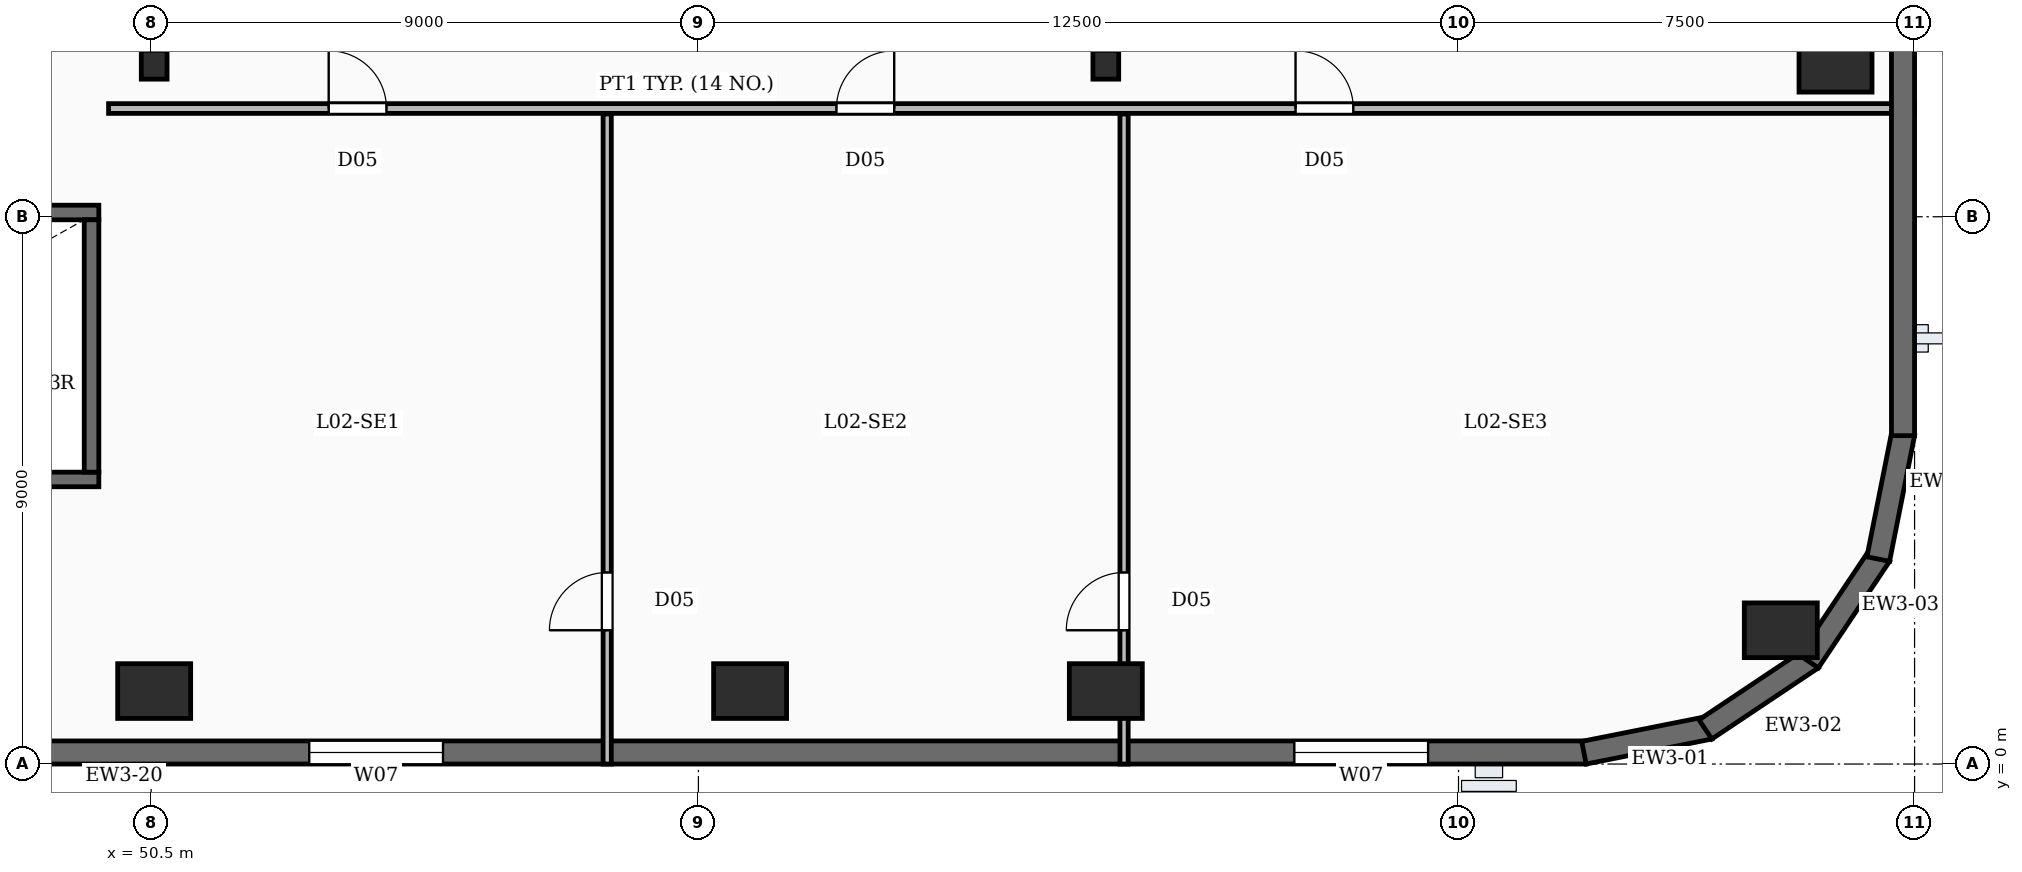
"""IFC4 building model, lengths in metres.
Left out: names, types, materials, properties, quantities, classifications, styles, units other than length and angle.
Written with IfcOpenShell. Run it as: python <this file> out.ifc"""

import sys

from ifc_helpers import new_model, si_unit, direction, frame, frame_2d, origin, origin_2d, place, context, subcontext, project, spatial, rectangle, i_section, extrude, element, fill, save


model = new_model("IFC4")
c1 = context("Model", 3, precision=1e-05, world=origin(), true_north=direction((0.0, 1.0)))
c2 = subcontext(c1, "Body", "Model", "MODEL_VIEW")
j1 = project(units=[si_unit("LENGTHUNIT", "METRE"), si_unit("PLANEANGLEUNIT", "RADIAN")], contexts=[c1])
p1 = place(None, origin())
s1 = spatial("IfcSite", under=j1, at=p1, CompositionType="ELEMENT")
p2 = place(p1, origin())
s2 = spatial("IfcBuilding", under=s1, at=p2, CompositionType="ELEMENT")
p3 = place(p2, frame((0.0, 0.0, 13.0)))
s3 = spatial("IfcBuildingStorey", under=s2, at=p3, CompositionType="ELEMENT", Elevation=13.0)
for number, where, z_axis, x_axis in (
    (1, (50.55, 1.2, -0.35), (0.0, 0.0, 1.0), (1.0, 0.0, 0.0)),
    (2, (60.35, 1.2, -0.35), (0.0, 0.0, 1.0), (1.0, 0.0, 0.0)),
    (3, (66.2, 1.2, -0.35), (0.0, 0.0, 1.0), (1.0, 0.0, 0.0)),
    (4, (77.3, 2.2, -0.35), (0.0, 0.0, 1.0), (1.0, 0.0, 0.0)),
    (5, (78.2, 11.5, -0.35), (0.0, 0.0, 1.0), (1.0, 0.0, 0.0)),
):
    element("IfcColumn", number, at=place(p3, frame(where, z_axis=z_axis, x_axis=x_axis)), inside=s3, PredefinedType="COLUMN", context=c2, shape_type="SweptSolid", body=[
        extrude(rectangle(XDim=1.2, YDim=0.9, at=origin_2d()), origin(), (0.0, 0.0, 1.0), 5.0),
    ])
for number, where, z_axis, x_axis in (
    (6, (50.55, 11.5, -0.35), (0.0, 0.0, 1.0), (1.0, 0.0, 0.0)),
    (7, (66.2, 11.5, -0.35), (0.0, 0.0, 1.0), (1.0, 0.0, 0.0)),
):
    element("IfcColumn", number, at=place(p3, frame(where, z_axis=z_axis, x_axis=x_axis)), inside=s3, PredefinedType="COLUMN", context=c2, shape_type="SweptSolid", body=[
        extrude(i_section(OverallWidth=0.424, OverallDepth=0.474, WebThickness=0.048, FlangeThickness=0.077, FilletRadius=0.02, at=origin_2d()), origin(), (0.0, 0.0, 1.0), 5.0),
    ])
for number, where, z_axis, x_axis in (
    (8, (76.129, 0.597, 0.0), (0.0, 0.0, 1.0), (-0.981, -0.195, 0.0)),
    (9, (77.813, 1.74, 0.0), (0.0, 0.0, 1.0), (-0.832, -0.556, 0.0)),
    (10, (78.931, 3.439, 0.0), (0.0, 0.0, 1.0), (-0.556, -0.832, 0.0)),
    (11, (79.314, 5.437, 0.0), (0.0, 0.0, 1.0), (-0.195, -0.981, 0.0)),
):
    element("IfcWall", number, at=place(p3, frame(where, z_axis=z_axis, x_axis=x_axis)), inside=s3, PredefinedType="SOLIDWALL", context=c2, shape_type="SweptSolid", body=[
        extrude(rectangle(XDim=2.107, YDim=0.38, at=frame_2d((1.053, 0.0))), origin(), (0.0, 0.0, 1.0), 4.65),
    ])
p4 = place(p3, frame((79.31, 49.1, 0.0), z_axis=(0.0, 0.0, 1.0), x_axis=(0.0, -1.0, 0.0)))
e12 = element("IfcWall", 12, at=p4, inside=s3, PredefinedType="SOLIDWALL", context=c2, shape_type="SweptSolid", body=[
    extrude(rectangle(XDim=43.7, YDim=0.38, at=frame_2d((21.85, 0.0))), origin(), (0.0, 0.0, 1.0), 4.65),
])
p5 = place(p4, frame((2.6, 0.0, 0.95)))
e13 = element("IfcOpeningElement", 13, at=p5, cuts=e12, PredefinedType="OPENING", context=c2, shape_type="SweptSolid", body=[
    extrude(rectangle(XDim=2.2, YDim=2.5, at=frame_2d((1.1, 1.25))), frame((0.0, 0.2, 0.0), z_axis=(0.0, -1.0, 0.0), x_axis=(1.0, 0.0, 0.0)), (0.0, 0.0, 1.0), 0.4),
])
p6 = place(p4, frame((8.0, 0.0, 0.95)))
e14 = element("IfcOpeningElement", 14, at=p6, cuts=e12, PredefinedType="OPENING", context=c2, shape_type="SweptSolid", body=[
    extrude(rectangle(XDim=2.2, YDim=2.5, at=frame_2d((1.1, 1.25))), frame((0.0, 0.2, 0.0), z_axis=(0.0, -1.0, 0.0), x_axis=(1.0, 0.0, 0.0)), (0.0, 0.0, 1.0), 0.4),
])
p7 = place(p4, frame((18.8, 0.0, 0.95)))
e15 = element("IfcOpeningElement", 15, at=p7, cuts=e12, PredefinedType="OPENING", context=c2, shape_type="SweptSolid", body=[
    extrude(rectangle(XDim=2.2, YDim=2.5, at=frame_2d((1.1, 1.25))), frame((0.0, 0.2, 0.0), z_axis=(0.0, -1.0, 0.0), x_axis=(1.0, 0.0, 0.0)), (0.0, 0.0, 1.0), 0.4),
])
p8 = place(p4, frame((24.2, 0.0, 0.95)))
e16 = element("IfcOpeningElement", 16, at=p8, cuts=e12, PredefinedType="OPENING", context=c2, shape_type="SweptSolid", body=[
    extrude(rectangle(XDim=2.2, YDim=2.5, at=frame_2d((1.1, 1.25))), frame((0.0, 0.2, 0.0), z_axis=(0.0, -1.0, 0.0), x_axis=(1.0, 0.0, 0.0)), (0.0, 0.0, 1.0), 0.4),
])
p9 = place(p4, frame((29.6, 0.0, 0.95)))
e17 = element("IfcOpeningElement", 17, at=p9, cuts=e12, PredefinedType="OPENING", context=c2, shape_type="SweptSolid", body=[
    extrude(rectangle(XDim=2.2, YDim=2.5, at=frame_2d((1.1, 1.25))), frame((0.0, 0.2, 0.0), z_axis=(0.0, -1.0, 0.0), x_axis=(1.0, 0.0, 0.0)), (0.0, 0.0, 1.0), 0.4),
])
p10 = place(p3, frame((74.1, 0.19, 0.0), z_axis=(0.0, 0.0, 1.0), x_axis=(-1.0, 0.0, 0.0)))
e18 = element("IfcWall", 18, at=p10, inside=s3, PredefinedType="SOLIDWALL", context=c2, shape_type="SweptSolid", body=[
    extrude(rectangle(XDim=68.7, YDim=0.38, at=frame_2d((34.35, 0.0))), origin(), (0.0, 0.0, 1.0), 4.65),
])
p11 = place(p10, frame((2.6, 0.0, 0.95)))
e19 = element("IfcOpeningElement", 19, at=p11, cuts=e18, PredefinedType="OPENING", context=c2, shape_type="SweptSolid", body=[
    extrude(rectangle(XDim=2.2, YDim=2.5, at=frame_2d((1.1, 1.25))), frame((0.0, 0.2, 0.0), z_axis=(0.0, -1.0, 0.0), x_axis=(1.0, 0.0, 0.0)), (0.0, 0.0, 1.0), 0.4),
])
p12 = place(p10, frame((18.8, 0.0, 0.95)))
e20 = element("IfcOpeningElement", 20, at=p12, cuts=e18, PredefinedType="OPENING", context=c2, shape_type="SweptSolid", body=[
    extrude(rectangle(XDim=2.2, YDim=2.5, at=frame_2d((1.1, 1.25))), frame((0.0, 0.2, 0.0), z_axis=(0.0, -1.0, 0.0), x_axis=(1.0, 0.0, 0.0)), (0.0, 0.0, 1.0), 0.4),
])
p13 = place(p10, frame((29.6, 0.0, 0.95)))
e21 = element("IfcOpeningElement", 21, at=p13, cuts=e18, PredefinedType="OPENING", context=c2, shape_type="SweptSolid", body=[
    extrude(rectangle(XDim=2.2, YDim=2.5, at=frame_2d((1.1, 1.25))), frame((0.0, 0.2, 0.0), z_axis=(0.0, -1.0, 0.0), x_axis=(1.0, 0.0, 0.0)), (0.0, 0.0, 1.0), 0.4),
])
p14 = place(p10, frame((40.4, 0.0, 0.95)))
e22 = element("IfcOpeningElement", 22, at=p14, cuts=e18, PredefinedType="OPENING", context=c2, shape_type="SweptSolid", body=[
    extrude(rectangle(XDim=2.2, YDim=2.5, at=frame_2d((1.1, 1.25))), frame((0.0, 0.2, 0.0), z_axis=(0.0, -1.0, 0.0), x_axis=(1.0, 0.0, 0.0)), (0.0, 0.0, 1.0), 0.4),
])
p15 = place(p10, frame((45.8, 0.0, 0.95)))
e23 = element("IfcOpeningElement", 23, at=p15, cuts=e18, PredefinedType="OPENING", context=c2, shape_type="SweptSolid", body=[
    extrude(rectangle(XDim=2.2, YDim=2.5, at=frame_2d((1.1, 1.25))), frame((0.0, 0.2, 0.0), z_axis=(0.0, -1.0, 0.0), x_axis=(1.0, 0.0, 0.0)), (0.0, 0.0, 1.0), 0.4),
])
p16 = place(p10, frame((51.2, 0.0, 0.95)))
e24 = element("IfcOpeningElement", 24, at=p16, cuts=e18, PredefinedType="OPENING", context=c2, shape_type="SweptSolid", body=[
    extrude(rectangle(XDim=2.2, YDim=2.5, at=frame_2d((1.1, 1.25))), frame((0.0, 0.2, 0.0), z_axis=(0.0, -1.0, 0.0), x_axis=(1.0, 0.0, 0.0)), (0.0, 0.0, 1.0), 0.4),
])
p17 = place(p10, frame((62.0, 0.0, 0.95)))
e25 = element("IfcOpeningElement", 25, at=p17, cuts=e18, PredefinedType="OPENING", context=c2, shape_type="SweptSolid", body=[
    extrude(rectangle(XDim=2.2, YDim=2.5, at=frame_2d((1.1, 1.25))), frame((0.0, 0.2, 0.0), z_axis=(0.0, -1.0, 0.0), x_axis=(1.0, 0.0, 0.0)), (0.0, 0.0, 1.0), 0.4),
])
p18 = place(p3, frame((39.76, 9.07, 0.0), z_axis=(0.0, 0.0, 1.0), x_axis=(1.0, 0.0, 0.0)))
e26 = element("IfcWall", 26, at=p18, inside=s3, PredefinedType="SOLIDWALL", context=c2, shape_type="SweptSolid", body=[
    extrude(rectangle(XDim=9.88, YDim=0.24, at=frame_2d((4.94, 0.0))), origin(), (0.0, 0.0, 1.0), 4.65),
])
p19 = place(p18, frame((0.69, 0.0, 0.0)))
e27 = element("IfcOpeningElement", 27, at=p19, cuts=e26, PredefinedType="OPENING", context=c2, shape_type="SweptSolid", body=[
    extrude(rectangle(XDim=1.1, YDim=2.15, at=frame_2d((0.55, 1.075))), frame((0.0, 0.13, 0.0), z_axis=(0.0, -1.0, 0.0), x_axis=(1.0, 0.0, 0.0)), (0.0, 0.0, 1.0), 0.26),
])
p20 = place(p3, frame((39.76, 4.68, 0.0), z_axis=(0.0, 0.0, 1.0), x_axis=(1.0, 0.0, 0.0)))
e28 = element("IfcWall", 28, at=p20, inside=s3, PredefinedType="SOLIDWALL", context=c2, shape_type="SweptSolid", body=[
    extrude(rectangle(XDim=9.88, YDim=0.24, at=frame_2d((4.94, 0.0))), origin(), (0.0, 0.0, 1.0), 4.65),
])
p21 = place(p3, frame((49.52, 4.8, 0.0), z_axis=(0.0, 0.0, 1.0), x_axis=(0.0, 1.0, 0.0)))
e29 = element("IfcWall", 29, at=p21, inside=s3, PredefinedType="SOLIDWALL", context=c2, shape_type="SweptSolid", body=[
    extrude(rectangle(XDim=4.15, YDim=0.24, at=frame_2d((2.075, 0.0))), origin(), (0.0, 0.0, 1.0), 4.65),
])
p22 = place(p3, frame((58.0, 0.0, 0.0), z_axis=(0.0, 0.0, 1.0), x_axis=(0.0, 1.0, 0.0)))
e30 = element("IfcWall", 30, at=p22, inside=s3, PredefinedType="PARTITIONING", context=c2, shape_type="SweptSolid", body=[
    extrude(rectangle(XDim=10.69, YDim=0.135, at=frame_2d((5.345, 0.0))), origin(), (0.0, 0.0, 1.0), 3.71),
])
p23 = place(p22, frame((2.2, 0.0, 0.0)))
e31 = element("IfcOpeningElement", 31, at=p23, cuts=e30, PredefinedType="OPENING", context=c2, shape_type="SweptSolid", body=[
    extrude(rectangle(XDim=0.95, YDim=2.15, at=frame_2d((0.475, 1.075))), frame((0.0, 0.077, 0.0), z_axis=(0.0, -1.0, 0.0), x_axis=(1.0, 0.0, 0.0)), (0.0, 0.0, 1.0), 0.155),
])
p24 = place(p3, frame((66.5, 0.0, 0.0), z_axis=(0.0, 0.0, 1.0), x_axis=(0.0, 1.0, 0.0)))
e32 = element("IfcWall", 32, at=p24, inside=s3, PredefinedType="PARTITIONING", context=c2, shape_type="SweptSolid", body=[
    extrude(rectangle(XDim=10.69, YDim=0.135, at=frame_2d((5.345, 0.0))), origin(), (0.0, 0.0, 1.0), 3.71),
])
p25 = place(p24, frame((2.2, 0.0, 0.0)))
e33 = element("IfcOpeningElement", 33, at=p25, cuts=e32, PredefinedType="OPENING", context=c2, shape_type="SweptSolid", body=[
    extrude(rectangle(XDim=0.95, YDim=2.15, at=frame_2d((0.475, 1.075))), frame((0.0, 0.077, 0.0), z_axis=(0.0, -1.0, 0.0), x_axis=(1.0, 0.0, 0.0)), (0.0, 0.0, 1.0), 0.155),
])
p26 = place(p3, frame((49.8, 10.78, 0.0), z_axis=(0.0, 0.0, 1.0), x_axis=(1.0, 0.0, 0.0)))
e34 = element("IfcWall", 34, at=p26, inside=s3, PredefinedType="PARTITIONING", context=c2, shape_type="SweptSolid", body=[
    extrude(rectangle(XDim=29.7, YDim=0.16, at=frame_2d((14.85, 0.0))), origin(), (0.0, 0.0, 1.0), 3.71),
])
p27 = place(p26, frame((3.62, 0.0, 0.0)))
e35 = element("IfcOpeningElement", 35, at=p27, cuts=e34, PredefinedType="OPENING", context=c2, shape_type="SweptSolid", body=[
    extrude(rectangle(XDim=0.95, YDim=2.15, at=frame_2d((0.475, 1.075))), frame((0.0, 0.09, 0.0), z_axis=(0.0, -1.0, 0.0), x_axis=(1.0, 0.0, 0.0)), (0.0, 0.0, 1.0), 0.18),
])
p28 = place(p26, frame((11.97, 0.0, 0.0)))
e36 = element("IfcOpeningElement", 36, at=p28, cuts=e34, PredefinedType="OPENING", context=c2, shape_type="SweptSolid", body=[
    extrude(rectangle(XDim=0.95, YDim=2.15, at=frame_2d((0.475, 1.075))), frame((0.0, 0.09, 0.0), z_axis=(0.0, -1.0, 0.0), x_axis=(1.0, 0.0, 0.0)), (0.0, 0.0, 1.0), 0.18),
])
p29 = place(p26, frame((19.52, 0.0, 0.0)))
e37 = element("IfcOpeningElement", 37, at=p29, cuts=e34, PredefinedType="OPENING", context=c2, shape_type="SweptSolid", body=[
    extrude(rectangle(XDim=0.95, YDim=2.15, at=frame_2d((0.475, 1.075))), frame((0.0, 0.09, 0.0), z_axis=(0.0, -1.0, 0.0), x_axis=(1.0, 0.0, 0.0)), (0.0, 0.0, 1.0), 0.18),
])
p30 = place(p11, origin())
e38 = element("IfcWindow", 38, at=p30, inside=s3, PartitioningType="DOUBLE_PANEL_VERTICAL", PredefinedType="WINDOW", context=c2, shape_type="SweptSolid", body=[
    extrude(rectangle(XDim=2.2, YDim=2.5, at=frame_2d((1.1, 1.25))), frame((0.0, 0.03, 0.0), z_axis=(0.0, -1.0, 0.0), x_axis=(1.0, 0.0, 0.0)), (0.0, 0.0, 1.0), 0.06),
])
fill(e19, e38)
p31 = place(p12, origin())
e39 = element("IfcWindow", 39, at=p31, inside=s3, PartitioningType="DOUBLE_PANEL_VERTICAL", PredefinedType="WINDOW", context=c2, shape_type="SweptSolid", body=[
    extrude(rectangle(XDim=2.2, YDim=2.5, at=frame_2d((1.1, 1.25))), frame((0.0, 0.03, 0.0), z_axis=(0.0, -1.0, 0.0), x_axis=(1.0, 0.0, 0.0)), (0.0, 0.0, 1.0), 0.06),
])
fill(e20, e39)
p32 = place(p23, origin())
e40 = element("IfcDoor", 40, at=p32, inside=s3, OperationType="SINGLE_SWING_LEFT", PredefinedType="DOOR", context=c2, shape_type="SweptSolid", body=[
    extrude(rectangle(XDim=0.95, YDim=2.15, at=frame_2d((0.475, 1.075))), frame((0.0, 0.025, 0.0), z_axis=(0.0, -1.0, 0.0), x_axis=(1.0, 0.0, 0.0)), (0.0, 0.0, 1.0), 0.05),
])
fill(e31, e40)
p33 = place(p25, origin())
e41 = element("IfcDoor", 41, at=p33, inside=s3, OperationType="SINGLE_SWING_LEFT", PredefinedType="DOOR", context=c2, shape_type="SweptSolid", body=[
    extrude(rectangle(XDim=0.95, YDim=2.15, at=frame_2d((0.475, 1.075))), frame((0.0, 0.025, 0.0), z_axis=(0.0, -1.0, 0.0), x_axis=(1.0, 0.0, 0.0)), (0.0, 0.0, 1.0), 0.05),
])
fill(e33, e41)
p34 = place(p27, origin())
e42 = element("IfcDoor", 42, at=p34, inside=s3, OperationType="SINGLE_SWING_LEFT", PredefinedType="DOOR", context=c2, shape_type="SweptSolid", body=[
    extrude(rectangle(XDim=0.95, YDim=2.15, at=frame_2d((0.475, 1.075))), frame((0.0, 0.025, 0.0), z_axis=(0.0, -1.0, 0.0), x_axis=(1.0, 0.0, 0.0)), (0.0, 0.0, 1.0), 0.05),
])
fill(e35, e42)
p35 = place(p28, origin())
e43 = element("IfcDoor", 43, at=p35, inside=s3, OperationType="SINGLE_SWING_RIGHT", PredefinedType="DOOR", context=c2, shape_type="SweptSolid", body=[
    extrude(rectangle(XDim=0.95, YDim=2.15, at=frame_2d((0.475, 1.075))), frame((0.0, 0.025, 0.0), z_axis=(0.0, -1.0, 0.0), x_axis=(1.0, 0.0, 0.0)), (0.0, 0.0, 1.0), 0.05),
])
fill(e36, e43)
p36 = place(p29, origin())
e44 = element("IfcDoor", 44, at=p36, inside=s3, OperationType="SINGLE_SWING_LEFT", PredefinedType="DOOR", context=c2, shape_type="SweptSolid", body=[
    extrude(rectangle(XDim=0.95, YDim=2.15, at=frame_2d((0.475, 1.075))), frame((0.0, 0.025, 0.0), z_axis=(0.0, -1.0, 0.0), x_axis=(1.0, 0.0, 0.0)), (0.0, 0.0, 1.0), 0.05),
])
fill(e37, e44)
save(model, sys.argv[1])
